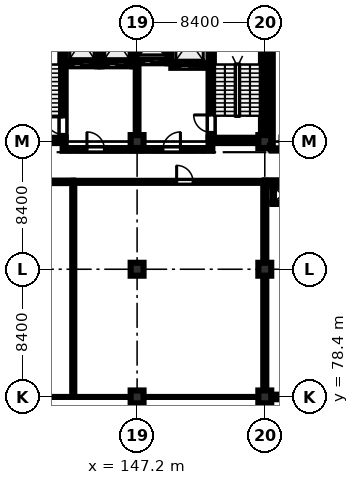
"""IFC4 building model, lengths in metres.
Left out: names, types, materials, properties, quantities, classifications, styles, units other than length and angle.
Written with IfcOpenShell. Run it as: python <this file> out.ifc"""

import sys

from ifc_helpers import new_model, si_unit, direction, frame, frame_2d, origin, origin_2d, place, context, subcontext, project, spatial, rectangle, extrude, element, fill, save


model = new_model("IFC4")
c1 = context("Model", 3, precision=1e-05, world=origin(), true_north=direction((0.0, 1.0)))
c2 = subcontext(c1, "Body", "Model", "MODEL_VIEW")
j1 = project(units=[si_unit("LENGTHUNIT", "METRE"), si_unit("PLANEANGLEUNIT", "RADIAN")], contexts=[c1])
p1 = place(None, origin())
s1 = spatial("IfcSite", under=j1, at=p1, CompositionType="ELEMENT")
p2 = place(p1, origin())
s2 = spatial("IfcBuilding", under=s1, at=p2, CompositionType="ELEMENT")
p3 = place(p2, frame((0.0, 0.0, 31.8)))
s3 = spatial("IfcBuildingStorey", under=s2, at=p3, CompositionType="ELEMENT", Elevation=31.8)
for number, where, z_axis, x_axis in (
    (1, (147.2, 78.4, 0.0), (0.0, 0.0, 1.0), (1.0, 0.0, 0.0)),
    (2, (147.2, 86.8, 0.0), (0.0, 0.0, 1.0), (1.0, 0.0, 0.0)),
    (3, (147.2, 95.2, 0.0), (0.0, 0.0, 1.0), (1.0, 0.0, 0.0)),
    (4, (155.6, 78.4, 0.0), (0.0, 0.0, 1.0), (1.0, 0.0, 0.0)),
    (5, (155.6, 86.8, 0.0), (0.0, 0.0, 1.0), (1.0, 0.0, 0.0)),
    (6, (155.6, 95.2, 0.0), (0.0, 0.0, 1.0), (1.0, 0.0, 0.0)),
):
    element("IfcColumn", number, at=place(p3, frame(where, z_axis=z_axis, x_axis=x_axis)), inside=s3, PredefinedType="COLUMN", context=c2, shape_type="SweptSolid", body=[
        extrude(rectangle(XDim=0.85, YDim=0.85, at=origin_2d()), origin(), (0.0, 0.0, 1.0), 4.02),
    ])
p4 = place(p3, frame((138.7, 95.275, 0.0), z_axis=(0.0, 0.0, 1.0), x_axis=(1.0, 0.0, 0.0)))
e7 = element("IfcWall", 7, at=p4, inside=s3, PredefinedType="SHEAR", context=c2, shape_type="SweptSolid", body=[
    extrude(rectangle(XDim=3.8, YDim=0.35, at=frame_2d((1.9, 0.0))), origin(), (0.0, 0.0, 1.0), 4.02),
])
p5 = place(p3, frame((142.325, 95.45, 0.0), z_axis=(0.0, 0.0, 1.0), x_axis=(0.0, 1.0, 0.0)))
e8 = element("IfcWall", 8, at=p5, inside=s3, PredefinedType="SHEAR", context=c2, shape_type="SweptSolid", body=[
    extrude(rectangle(XDim=7.9, YDim=0.35, at=frame_2d((3.95, 0.0))), origin(), (0.0, 0.0, 1.0), 4.02),
])
p6 = place(p5, frame((0.22, 0.0, 0.0)))
e9 = element("IfcOpeningElement", 9, at=p6, cuts=e8, PredefinedType="OPENING", context=c2, shape_type="SweptSolid", body=[
    extrude(rectangle(XDim=1.15, YDim=2.15, at=frame_2d((0.575, 1.075))), frame((0.0, 0.185, 0.0), z_axis=(0.0, -1.0, 0.0), x_axis=(1.0, 0.0, 0.0)), (0.0, 0.0, 1.0), 0.37),
])
p7 = place(p3, frame((151.9, 95.275, 0.0), z_axis=(0.0, 0.0, 1.0), x_axis=(1.0, 0.0, 0.0)))
e10 = element("IfcWall", 10, at=p7, inside=s3, PredefinedType="SHEAR", context=c2, shape_type="SweptSolid", body=[
    extrude(rectangle(XDim=3.8, YDim=0.35, at=frame_2d((1.9, 0.0))), origin(), (0.0, 0.0, 1.0), 4.02),
])
p8 = place(p3, frame((152.075, 95.45, 0.0), z_axis=(0.0, 0.0, 1.0), x_axis=(0.0, 1.0, 0.0)))
e11 = element("IfcWall", 11, at=p8, inside=s3, PredefinedType="SHEAR", context=c2, shape_type="SweptSolid", body=[
    extrude(rectangle(XDim=7.9, YDim=0.35, at=frame_2d((3.95, 0.0))), origin(), (0.0, 0.0, 1.0), 4.02),
])
p9 = place(p8, frame((0.35, 0.0, 0.0)))
e12 = element("IfcOpeningElement", 12, at=p9, cuts=e11, PredefinedType="OPENING", context=c2, shape_type="SweptSolid", body=[
    extrude(rectangle(XDim=1.15, YDim=2.15, at=frame_2d((0.575, 1.075))), frame((0.0, 0.185, 0.0), z_axis=(0.0, -1.0, 0.0), x_axis=(1.0, 0.0, 0.0)), (0.0, 0.0, 1.0), 0.37),
])
p10 = place(p3, frame((155.525, 95.45, 0.0), z_axis=(0.0, 0.0, 1.0), x_axis=(0.0, 1.0, 0.0)))
e13 = element("IfcWall", 13, at=p10, inside=s3, PredefinedType="SHEAR", context=c2, shape_type="SweptSolid", body=[
    extrude(rectangle(XDim=7.9, YDim=0.35, at=frame_2d((3.95, 0.0))), origin(), (0.0, 0.0, 1.0), 4.02),
])
p11 = place(p3, frame((142.5, 100.275, 0.0), z_axis=(0.0, 0.0, 1.0), x_axis=(1.0, 0.0, 0.0)))
e14 = element("IfcWall", 14, at=p11, inside=s3, PredefinedType="SHEAR", context=c2, shape_type="SweptSolid", body=[
    extrude(rectangle(XDim=2.1, YDim=0.25, at=frame_2d((1.05, 0.0))), origin(), (0.0, 0.0, 1.0), 4.02),
])
p12 = place(p11, frame((0.5, 0.0, 0.0)))
e15 = element("IfcOpeningElement", 15, at=p12, cuts=e14, PredefinedType="OPENING", context=c2, shape_type="SweptSolid", body=[
    extrude(rectangle(XDim=1.1, YDim=2.15, at=frame_2d((0.55, 1.075))), frame((0.0, 0.135, 0.0), z_axis=(0.0, -1.0, 0.0), x_axis=(1.0, 0.0, 0.0)), (0.0, 0.0, 1.0), 0.27),
])
p13 = place(p3, frame((144.725, 100.15, 0.0), z_axis=(0.0, 0.0, 1.0), x_axis=(0.0, 1.0, 0.0)))
e16 = element("IfcWall", 16, at=p13, inside=s3, PredefinedType="SHEAR", context=c2, shape_type="SweptSolid", body=[
    extrude(rectangle(XDim=3.4, YDim=0.25, at=frame_2d((1.7, 0.0))), origin(), (0.0, 0.0, 1.0), 4.02),
])
p14 = place(p3, frame((144.85, 100.275, 0.0), z_axis=(0.0, 0.0, 1.0), x_axis=(1.0, 0.0, 0.0)))
e17 = element("IfcWall", 17, at=p14, inside=s3, PredefinedType="SHEAR", context=c2, shape_type="SweptSolid", body=[
    extrude(rectangle(XDim=2.05, YDim=0.25, at=frame_2d((1.025, 0.0))), origin(), (0.0, 0.0, 1.0), 4.02),
])
p15 = place(p14, frame((0.465, 0.0, 0.0)))
e18 = element("IfcOpeningElement", 18, at=p15, cuts=e17, PredefinedType="OPENING", context=c2, shape_type="SweptSolid", body=[
    extrude(rectangle(XDim=1.12, YDim=2.15, at=frame_2d((0.56, 1.075))), frame((0.0, 0.135, 0.0), z_axis=(0.0, -1.0, 0.0), x_axis=(1.0, 0.0, 0.0)), (0.0, 0.0, 1.0), 0.27),
])
p16 = place(p3, frame((147.025, 100.15, 0.0), z_axis=(0.0, 0.0, 1.0), x_axis=(0.0, 1.0, 0.0)))
e19 = element("IfcWall", 19, at=p16, inside=s3, PredefinedType="SHEAR", context=c2, shape_type="SweptSolid", body=[
    extrude(rectangle(XDim=3.4, YDim=0.25, at=frame_2d((1.7, 0.0))), origin(), (0.0, 0.0, 1.0), 4.02),
])
p17 = place(p3, frame((147.15, 100.475, 0.0), z_axis=(0.0, 0.0, 1.0), x_axis=(1.0, 0.0, 0.0)))
e20 = element("IfcWall", 20, at=p17, inside=s3, PredefinedType="SHEAR", context=c2, shape_type="SweptSolid", body=[
    extrude(rectangle(XDim=2.05, YDim=0.25, at=frame_2d((1.025, 0.0))), origin(), (0.0, 0.0, 1.0), 4.02),
])
p18 = place(p17, frame((0.495, 0.0, 0.0)))
e21 = element("IfcOpeningElement", 21, at=p18, cuts=e20, PredefinedType="OPENING", context=c2, shape_type="SweptSolid", body=[
    extrude(rectangle(XDim=1.06, YDim=2.15, at=frame_2d((0.53, 1.075))), frame((0.0, 0.135, 0.0), z_axis=(0.0, -1.0, 0.0), x_axis=(1.0, 0.0, 0.0)), (0.0, 0.0, 1.0), 0.27),
])
p19 = place(p3, frame((149.325, 100.35, 0.0), z_axis=(0.0, 0.0, 1.0), x_axis=(0.0, 1.0, 0.0)))
e22 = element("IfcWall", 22, at=p19, inside=s3, PredefinedType="SHEAR", context=c2, shape_type="SweptSolid", body=[
    extrude(rectangle(XDim=3.2, YDim=0.25, at=frame_2d((1.6, 0.0))), origin(), (0.0, 0.0, 1.0), 4.02),
])
p20 = place(p3, frame((149.45, 100.175, 0.0), z_axis=(0.0, 0.0, 1.0), x_axis=(1.0, 0.0, 0.0)))
e23 = element("IfcWall", 23, at=p20, inside=s3, PredefinedType="SHEAR", context=c2, shape_type="SweptSolid", body=[
    extrude(rectangle(XDim=2.45, YDim=0.25, at=frame_2d((1.225, 0.0))), origin(), (0.0, 0.0, 1.0), 4.02),
])
p21 = place(p20, frame((0.575, 0.0, 0.0)))
e24 = element("IfcOpeningElement", 24, at=p21, cuts=e23, PredefinedType="OPENING", context=c2, shape_type="SweptSolid", body=[
    extrude(rectangle(XDim=1.3, YDim=2.25, at=frame_2d((0.65, 1.125))), frame((0.0, 0.135, 0.0), z_axis=(0.0, -1.0, 0.0), x_axis=(1.0, 0.0, 0.0)), (0.0, 0.0, 1.0), 0.27),
])
p22 = place(p3, frame((163.025, 78.4, 0.0), z_axis=(0.0, 0.0, 1.0), x_axis=(-1.0, 0.0, 0.0)))
e25 = element("IfcWall", 25, at=p22, inside=s3, PredefinedType="STANDARD", context=c2, shape_type="SweptSolid", body=[
    extrude(rectangle(XDim=7.0, YDim=0.3, at=frame_2d((3.5, 0.0))), origin(), (0.0, 0.0, 1.0), 3.32),
])
p23 = place(p22, frame((1.15, 0.0, 0.95)))
e26 = element("IfcOpeningElement", 26, at=p23, cuts=e25, PredefinedType="OPENING", context=c2, shape_type="SweptSolid", body=[
    extrude(rectangle(XDim=2.05, YDim=2.05, at=frame_2d((1.025, 1.025))), frame((0.0, 0.16, 0.0), z_axis=(0.0, -1.0, 0.0), x_axis=(1.0, 0.0, 0.0)), (0.0, 0.0, 1.0), 0.32),
])
p24 = place(p3, frame((142.3, 94.68, 0.0), z_axis=(0.0, 0.0, 1.0), x_axis=(1.0, 0.0, 0.0)))
e27 = element("IfcWall", 27, at=p24, inside=s3, PredefinedType="STANDARD", context=c2, shape_type="SweptSolid", body=[
    extrude(rectangle(XDim=4.8, YDim=0.18, at=frame_2d((2.4, 0.0))), origin(), (0.0, 0.0, 1.0), 4.02),
])
p25 = place(p24, frame((1.6, 0.0, 0.0)))
e28 = element("IfcOpeningElement", 28, at=p25, cuts=e27, PredefinedType="OPENING", context=c2, shape_type="SweptSolid", body=[
    extrude(rectangle(XDim=1.15, YDim=2.15, at=frame_2d((0.575, 1.075))), frame((0.0, 0.1, 0.0), z_axis=(0.0, -1.0, 0.0), x_axis=(1.0, 0.0, 0.0)), (0.0, 0.0, 1.0), 0.2),
])
p26 = place(p3, frame((147.3, 94.68, 0.0), z_axis=(0.0, 0.0, 1.0), x_axis=(1.0, 0.0, 0.0)))
e29 = element("IfcWall", 29, at=p26, inside=s3, PredefinedType="STANDARD", context=c2, shape_type="SweptSolid", body=[
    extrude(rectangle(XDim=4.85, YDim=0.18, at=frame_2d((2.425, 0.0))), origin(), (0.0, 0.0, 1.0), 4.02),
])
p27 = place(p26, frame((1.6, 0.0, 0.0)))
e30 = element("IfcOpeningElement", 30, at=p27, cuts=e29, PredefinedType="OPENING", context=c2, shape_type="SweptSolid", body=[
    extrude(rectangle(XDim=1.15, YDim=2.15, at=frame_2d((0.575, 1.075))), frame((0.0, 0.1, 0.0), z_axis=(0.0, -1.0, 0.0), x_axis=(1.0, 0.0, 0.0)), (0.0, 0.0, 1.0), 0.2),
])
p28 = place(p3, frame((147.2, 95.75, 0.0), z_axis=(0.0, 0.0, 1.0), x_axis=(0.0, 1.0, 0.0)))
e31 = element("IfcWall", 31, at=p28, inside=s3, PredefinedType="STANDARD", context=c2, shape_type="SweptSolid", body=[
    extrude(rectangle(XDim=4.5, YDim=0.18, at=frame_2d((2.25, 0.0))), origin(), (0.0, 0.0, 1.0), 3.32),
])
p29 = place(p3, frame((156.05, 94.68, 0.0), z_axis=(0.0, 0.0, 1.0), x_axis=(1.0, 0.0, 0.0)))
e32 = element("IfcWall", 32, at=p29, inside=s3, PredefinedType="PARTITIONING", context=c2, shape_type="SweptSolid", body=[
    extrude(rectangle(XDim=7.15, YDim=0.15, at=frame_2d((3.575, 0.0))), origin(), (0.0, 0.0, 1.0), 4.02),
])
p30 = place(p29, frame((0.55, 0.0, 0.0)))
e33 = element("IfcOpeningElement", 33, at=p30, cuts=e32, PredefinedType="OPENING", context=c2, shape_type="SweptSolid", body=[
    extrude(rectangle(XDim=0.98, YDim=2.12, at=frame_2d((0.49, 1.06))), frame((0.0, 0.085, 0.0), z_axis=(0.0, -1.0, 0.0), x_axis=(1.0, 0.0, 0.0)), (0.0, 0.0, 1.0), 0.17),
])
p31 = place(p3, frame((156.05, 94.68, 0.0), z_axis=(0.0, 0.0, 1.0), x_axis=(0.0, 1.0, 0.0)))
e34 = element("IfcWall", 34, at=p31, inside=s3, PredefinedType="PARTITIONING", context=c2, shape_type="SweptSolid", body=[
    extrude(rectangle(XDim=8.57, YDim=0.15, at=frame_2d((4.285, 0.0))), origin(), (0.0, 0.0, 1.0), 4.02),
])
p32 = place(p3, frame((130.55, 92.55, 0.0), z_axis=(0.0, 0.0, 1.0), x_axis=(1.0, 0.0, 0.0)))
e35 = element("IfcWall", 35, at=p32, inside=s3, PredefinedType="PARTITIONING", context=c2, shape_type="SweptSolid", body=[
    extrude(rectangle(XDim=12.45, YDim=0.165, at=frame_2d((6.225, 0.0))), origin(), (0.0, 0.0, 1.0), 4.02),
])
p33 = place(p32, frame((3.65, 0.0, 0.0)))
e36 = element("IfcOpeningElement", 36, at=p33, cuts=e35, PredefinedType="OPENING", context=c2, shape_type="SweptSolid", body=[
    extrude(rectangle(XDim=1.6, YDim=2.24, at=frame_2d((0.8, 1.12))), frame((0.0, 0.093, 0.0), z_axis=(0.0, -1.0, 0.0), x_axis=(1.0, 0.0, 0.0)), (0.0, 0.0, 1.0), 0.185),
])
p34 = place(p3, frame((143.0, 92.55, 0.0), z_axis=(0.0, 0.0, 1.0), x_axis=(1.0, 0.0, 0.0)))
e37 = element("IfcWall", 37, at=p34, inside=s3, PredefinedType="PARTITIONING", context=c2, shape_type="SweptSolid", body=[
    extrude(rectangle(XDim=12.6, YDim=0.135, at=frame_2d((6.3, 0.0))), origin(), (0.0, 0.0, 1.0), 4.02),
])
p35 = place(p34, frame((6.8, 0.0, 0.0)))
e38 = element("IfcOpeningElement", 38, at=p35, cuts=e37, PredefinedType="OPENING", context=c2, shape_type="SweptSolid", body=[
    extrude(rectangle(XDim=1.08, YDim=2.15, at=frame_2d((0.54, 1.075))), frame((0.0, 0.077, 0.0), z_axis=(0.0, -1.0, 0.0), x_axis=(1.0, 0.0, 0.0)), (0.0, 0.0, 1.0), 0.155),
])
p36 = place(p3, frame((143.0, 78.55, 0.0), z_axis=(0.0, 0.0, 1.0), x_axis=(0.0, 1.0, 0.0)))
e39 = element("IfcWall", 39, at=p36, inside=s3, PredefinedType="PARTITIONING", context=c2, shape_type="SweptSolid", body=[
    extrude(rectangle(XDim=14.0, YDim=0.135, at=frame_2d((7.0, 0.0))), origin(), (0.0, 0.0, 1.0), 3.52),
])
p37 = place(p3, frame((155.6, 92.55, 0.0), z_axis=(0.0, 0.0, 1.0), x_axis=(1.0, 0.0, 0.0)))
e40 = element("IfcWall", 40, at=p37, inside=s3, PredefinedType="SOLIDWALL", context=c2, shape_type="SweptSolid", body=[
    extrude(rectangle(XDim=7.75, YDim=0.2, at=frame_2d((3.875, 0.0))), origin(), (0.0, 0.0, 1.0), 4.02),
])
p38 = place(p37, frame((3.4, 0.0, 0.0)))
e41 = element("IfcOpeningElement", 41, at=p38, cuts=e40, PredefinedType="OPENING", context=c2, shape_type="SweptSolid", body=[
    extrude(rectangle(XDim=1.5, YDim=2.2, at=frame_2d((0.75, 1.1))), frame((0.0, 0.11, 0.0), z_axis=(0.0, -1.0, 0.0), x_axis=(1.0, 0.0, 0.0)), (0.0, 0.0, 1.0), 0.22),
])
p39 = place(p3, frame((155.6, 78.55, 0.0), z_axis=(0.0, 0.0, 1.0), x_axis=(0.0, 1.0, 0.0)))
e42 = element("IfcWall", 42, at=p39, inside=s3, PredefinedType="SOLIDWALL", context=c2, shape_type="SweptSolid", body=[
    extrude(rectangle(XDim=14.0, YDim=0.2, at=frame_2d((7.0, 0.0))), origin(), (0.0, 0.0, 1.0), 3.32),
])
for number, where, z_axis, x_axis in (
    (43, (156.095, 91.147, 0.0), (0.0, 0.0, 1.0), (1.0, 0.0, 0.0)),
    (44, (156.095, 92.252, 0.0), (0.0, 0.0, 1.0), (1.0, 0.0, 0.0)),
):
    element("IfcWall", number, at=place(p3, frame(where, z_axis=z_axis, x_axis=x_axis)), inside=s3, PredefinedType="PARTITIONING", context=c2, shape_type="SweptSolid", body=[
        extrude(rectangle(XDim=1.31, YDim=0.105, at=frame_2d((0.655, 0.0))), origin(), (0.0, 0.0, 1.0), 4.02),
    ])
p40 = place(p3, frame((156.147, 91.2, 0.0), z_axis=(0.0, 0.0, 1.0), x_axis=(0.0, 1.0, 0.0)))
e45 = element("IfcWall", 45, at=p40, inside=s3, PredefinedType="PARTITIONING", context=c2, shape_type="SweptSolid", body=[
    extrude(rectangle(XDim=1.0, YDim=0.105, at=frame_2d((0.5, 0.0))), origin(), (0.0, 0.0, 1.0), 4.02),
])
p41 = place(p25, origin())
e46 = element("IfcDoor", 46, at=p41, inside=s3, OperationType="SINGLE_SWING_LEFT", PredefinedType="DOOR", context=c2, shape_type="SweptSolid", body=[
    extrude(rectangle(XDim=1.15, YDim=2.15, at=frame_2d((0.575, 1.075))), frame((0.0, 0.025, 0.0), z_axis=(0.0, -1.0, 0.0), x_axis=(1.0, 0.0, 0.0)), (0.0, 0.0, 1.0), 0.05),
])
fill(e28, e46)
p42 = place(p27, origin())
e47 = element("IfcDoor", 47, at=p42, inside=s3, OperationType="SINGLE_SWING_RIGHT", PredefinedType="DOOR", context=c2, shape_type="SweptSolid", body=[
    extrude(rectangle(XDim=1.15, YDim=2.15, at=frame_2d((0.575, 1.075))), frame((0.0, 0.025, 0.0), z_axis=(0.0, -1.0, 0.0), x_axis=(1.0, 0.0, 0.0)), (0.0, 0.0, 1.0), 0.05),
])
fill(e30, e47)
p43 = place(p35, origin())
e48 = element("IfcDoor", 48, at=p43, inside=s3, OperationType="SINGLE_SWING_LEFT", PredefinedType="DOOR", context=c2, shape_type="SweptSolid", body=[
    extrude(rectangle(XDim=1.08, YDim=2.15, at=frame_2d((0.54, 1.075))), frame((0.0, 0.025, 0.0), z_axis=(0.0, -1.0, 0.0), x_axis=(1.0, 0.0, 0.0)), (0.0, 0.0, 1.0), 0.05),
])
fill(e38, e48)
p44 = place(p6, origin())
e49 = element("IfcDoor", 49, at=p44, inside=s3, OperationType="SINGLE_SWING_RIGHT", PredefinedType="DOOR", context=c2, shape_type="SweptSolid", body=[
    extrude(rectangle(XDim=1.15, YDim=2.15, at=frame_2d((0.575, 1.075))), frame((0.0, 0.025, 0.0), z_axis=(0.0, -1.0, 0.0), x_axis=(1.0, 0.0, 0.0)), (0.0, 0.0, 1.0), 0.05),
])
fill(e9, e49)
p45 = place(p9, origin())
e50 = element("IfcDoor", 50, at=p45, inside=s3, OperationType="SINGLE_SWING_RIGHT", PredefinedType="DOOR", context=c2, shape_type="SweptSolid", body=[
    extrude(rectangle(XDim=1.15, YDim=2.15, at=frame_2d((0.575, 1.075))), frame((0.0, 0.025, 0.0), z_axis=(0.0, -1.0, 0.0), x_axis=(1.0, 0.0, 0.0)), (0.0, 0.0, 1.0), 0.05),
])
fill(e12, e50)
p46 = place(p12, origin())
e51 = element("IfcDoor", 51, at=p46, inside=s3, OperationType="SLIDING_TO_LEFT", PredefinedType="DOOR", context=c2, shape_type="SweptSolid", body=[
    extrude(rectangle(XDim=1.1, YDim=2.15, at=frame_2d((0.55, 1.075))), frame((0.0, 0.025, 0.0), z_axis=(0.0, -1.0, 0.0), x_axis=(1.0, 0.0, 0.0)), (0.0, 0.0, 1.0), 0.05),
])
fill(e15, e51)
p47 = place(p15, origin())
e52 = element("IfcDoor", 52, at=p47, inside=s3, OperationType="SLIDING_TO_LEFT", PredefinedType="DOOR", context=c2, shape_type="SweptSolid", body=[
    extrude(rectangle(XDim=1.12, YDim=2.15, at=frame_2d((0.56, 1.075))), frame((0.0, 0.025, 0.0), z_axis=(0.0, -1.0, 0.0), x_axis=(1.0, 0.0, 0.0)), (0.0, 0.0, 1.0), 0.05),
])
fill(e18, e52)
p48 = place(p18, origin())
e53 = element("IfcDoor", 53, at=p48, inside=s3, OperationType="SLIDING_TO_LEFT", PredefinedType="DOOR", context=c2, shape_type="SweptSolid", body=[
    extrude(rectangle(XDim=1.06, YDim=2.15, at=frame_2d((0.53, 1.075))), frame((0.0, 0.025, 0.0), z_axis=(0.0, -1.0, 0.0), x_axis=(1.0, 0.0, 0.0)), (0.0, 0.0, 1.0), 0.05),
])
fill(e21, e53)
p49 = place(p21, origin())
e54 = element("IfcDoor", 54, at=p49, inside=s3, OperationType="SLIDING_TO_LEFT", PredefinedType="DOOR", context=c2, shape_type="SweptSolid", body=[
    extrude(rectangle(XDim=1.3, YDim=2.25, at=frame_2d((0.65, 1.125))), frame((0.0, 0.025, 0.0), z_axis=(0.0, -1.0, 0.0), x_axis=(1.0, 0.0, 0.0)), (0.0, 0.0, 1.0), 0.05),
])
fill(e24, e54)
save(model, sys.argv[1])
